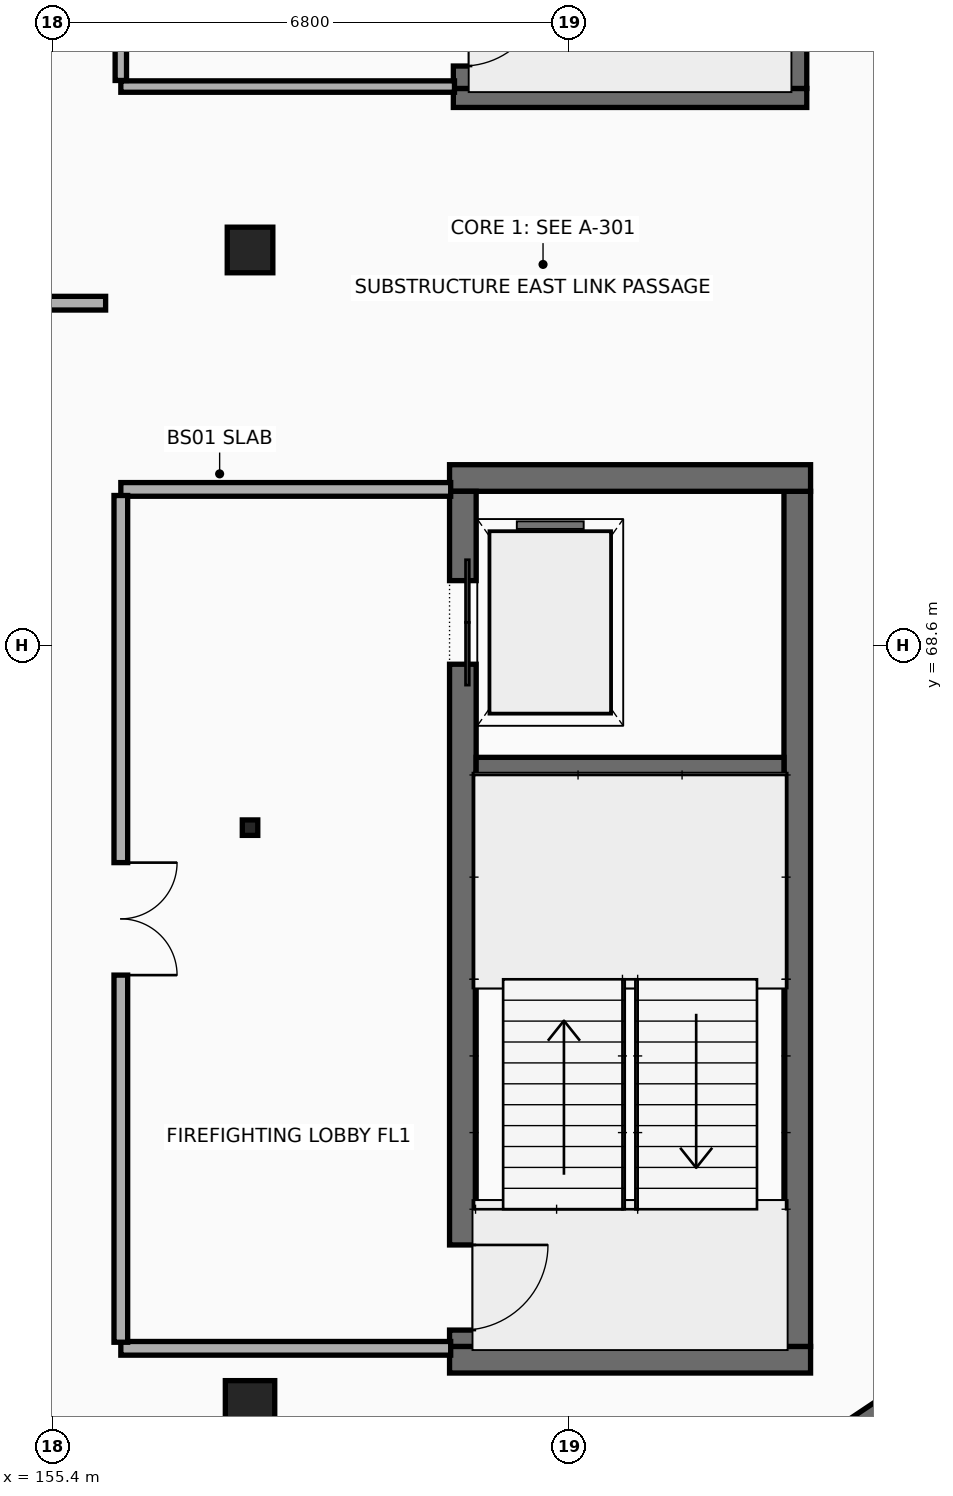
"""IFC4 building model, lengths in metres.
Left out: names, types, materials, properties, quantities, classifications, styles, units other than length and angle.
Written with IfcOpenShell. Run it as: python <this file> out.ifc"""

import sys

from ifc_helpers import new_model, si_unit, direction, frame, frame_2d, origin, origin_2d, place, context, subcontext, project, spatial, rectangle, i_section, extrude, element, fill, save


model = new_model("IFC4")
c1 = context("Model", 3, precision=1e-05, world=origin(), true_north=direction((0.0, 1.0)))
c2 = subcontext(c1, "Body", "Model", "MODEL_VIEW")
j1 = project(units=[si_unit("LENGTHUNIT", "METRE"), si_unit("PLANEANGLEUNIT", "RADIAN")], contexts=[c1])
p1 = place(None, origin())
s1 = spatial("IfcSite", under=j1, at=p1, CompositionType="ELEMENT")
p2 = place(p1, origin())
s2 = spatial("IfcBuilding", under=s1, at=p2, CompositionType="ELEMENT")
p3 = place(p2, frame((0.0, 0.0, -4.2)))
s3 = spatial("IfcBuildingStorey", under=s2, at=p3, CompositionType="ELEMENT", Elevation=-4.2)
p4 = place(p3, frame((160.625, 59.2, -0.415), z_axis=(0.0, 0.0, 1.0), x_axis=(1.0, 0.0, 0.0)))
e1 = element("IfcWall", 1, at=p4, inside=s3, PredefinedType="SHEAR", context=c2, shape_type="SweptSolid", body=[
    extrude(rectangle(XDim=4.75, YDim=0.35, at=frame_2d((2.375, 0.0))), origin(), (0.0, 0.0, 1.0), 4.615),
])
p5 = place(p3, frame((165.2, 59.375, -0.415), z_axis=(0.0, 0.0, 1.0), x_axis=(0.0, 1.0, 0.0)))
e2 = element("IfcWall", 2, at=p5, inside=s3, PredefinedType="SHEAR", context=c2, shape_type="SweptSolid", body=[
    extrude(rectangle(XDim=11.25, YDim=0.35, at=frame_2d((5.625, 0.0))), origin(), (0.0, 0.0, 1.0), 4.615),
])
p6 = place(p3, frame((165.375, 70.8, -0.415), z_axis=(0.0, 0.0, 1.0), x_axis=(-1.0, 0.0, 0.0)))
e3 = element("IfcWall", 3, at=p6, inside=s3, PredefinedType="SHEAR", context=c2, shape_type="SweptSolid", body=[
    extrude(rectangle(XDim=4.75, YDim=0.35, at=frame_2d((2.375, 0.0))), origin(), (0.0, 0.0, 1.0), 4.615),
])
p7 = place(p3, frame((160.8, 70.625, -0.415), z_axis=(0.0, 0.0, 1.0), x_axis=(0.0, -1.0, 0.0)))
e4 = element("IfcWall", 4, at=p7, inside=s3, PredefinedType="SHEAR", context=c2, shape_type="SweptSolid", body=[
    extrude(rectangle(XDim=11.25, YDim=0.35, at=frame_2d((5.625, 0.0))), origin(), (0.0, 0.0, 1.0), 4.615),
])
p8 = place(p7, frame((1.175, 0.0, 0.415)))
e5 = element("IfcOpeningElement", 5, at=p8, cuts=e4, PredefinedType="OPENING", context=c2, shape_type="SweptSolid", body=[
    extrude(rectangle(XDim=1.1, YDim=2.2, at=frame_2d((0.55, 1.1))), frame((0.0, 0.185, 0.0), z_axis=(0.0, -1.0, 0.0), x_axis=(1.0, 0.0, 0.0)), (0.0, 0.0, 1.0), 0.37),
])
p9 = place(p7, frame((9.915, 0.0, 0.415)))
e6 = element("IfcOpeningElement", 6, at=p9, cuts=e4, PredefinedType="OPENING", context=c2, shape_type="SweptSolid", body=[
    extrude(rectangle(XDim=1.12, YDim=2.16, at=frame_2d((0.56, 1.08))), frame((0.0, 0.185, 0.0), z_axis=(0.0, -1.0, 0.0), x_axis=(1.0, 0.0, 0.0)), (0.0, 0.0, 1.0), 0.37),
])
p10 = place(p3, frame((160.975, 67.0, -0.415), z_axis=(0.0, 0.0, 1.0), x_axis=(1.0, 0.0, 0.0)))
e7 = element("IfcWall", 7, at=p10, inside=s3, PredefinedType="SHEAR", context=c2, shape_type="SweptSolid", body=[
    extrude(rectangle(XDim=4.05, YDim=0.25, at=frame_2d((2.025, 0.0))), origin(), (0.0, 0.0, 1.0), 4.615),
])
p11 = place(p3, frame((160.675, 75.8, -0.415), z_axis=(0.0, 0.0, 1.0), x_axis=(1.0, 0.0, 0.0)))
e8 = element("IfcWall", 8, at=p11, inside=s3, PredefinedType="SHEAR", context=c2, shape_type="SweptSolid", body=[
    extrude(rectangle(XDim=4.65, YDim=0.25, at=frame_2d((2.325, 0.0))), origin(), (0.0, 0.0, 1.0), 4.615),
])
p12 = place(p3, frame((165.2, 75.925, -0.415), z_axis=(0.0, 0.0, 1.0), x_axis=(0.0, 1.0, 0.0)))
e9 = element("IfcWall", 9, at=p12, inside=s3, PredefinedType="SHEAR", context=c2, shape_type="SweptSolid", body=[
    extrude(rectangle(XDim=11.35, YDim=0.25, at=frame_2d((5.675, 0.0))), origin(), (0.0, 0.0, 1.0), 4.615),
])
p13 = place(p3, frame((160.8, 87.275, -0.415), z_axis=(0.0, 0.0, 1.0), x_axis=(0.0, -1.0, 0.0)))
e10 = element("IfcWall", 10, at=p13, inside=s3, PredefinedType="SHEAR", context=c2, shape_type="SweptSolid", body=[
    extrude(rectangle(XDim=11.35, YDim=0.25, at=frame_2d((5.675, 0.0))), origin(), (0.0, 0.0, 1.0), 4.615),
])
p14 = place(p13, frame((1.275, 0.0, 0.415)))
e11 = element("IfcOpeningElement", 11, at=p14, cuts=e10, PredefinedType="OPENING", context=c2, shape_type="SweptSolid", body=[
    extrude(rectangle(XDim=1.0, YDim=2.15, at=frame_2d((0.5, 1.075))), frame((0.0, 0.135, 0.0), z_axis=(0.0, -1.0, 0.0), x_axis=(1.0, 0.0, 0.0)), (0.0, 0.0, 1.0), 0.27),
])
p15 = place(p13, frame((9.995, 0.0, 0.415)))
e12 = element("IfcOpeningElement", 12, at=p15, cuts=e10, PredefinedType="OPENING", context=c2, shape_type="SweptSolid", body=[
    extrude(rectangle(XDim=1.06, YDim=2.15, at=frame_2d((0.53, 1.075))), frame((0.0, 0.135, 0.0), z_axis=(0.0, -1.0, 0.0), x_axis=(1.0, 0.0, 0.0)), (0.0, 0.0, 1.0), 0.27),
])
p16 = place(p3, frame((158.0, 58.6, -0.415), z_axis=(0.0, 0.0, 1.0), x_axis=(1.0, 0.0, 0.0)))
e13 = element("IfcColumn", 13, at=p16, inside=s3, PredefinedType="COLUMN", context=c2, shape_type="SweptSolid", body=[
    extrude(rectangle(XDim=0.65, YDim=0.65, at=origin_2d()), origin(), (0.0, 0.0, 1.0), 4.615),
])
p17 = place(p3, frame((158.0, 66.2, -0.415), z_axis=(0.0, 0.0, 1.0), x_axis=(1.0, 0.0, 0.0)))
e14 = element("IfcColumn", 14, at=p17, inside=s3, PredefinedType="COLUMN", context=c2, shape_type="SweptSolid", body=[
    extrude(i_section(OverallWidth=0.204, OverallDepth=0.203, WebThickness=0.007, FlangeThickness=0.011, at=origin_2d()), origin(), (0.0, 0.0, 1.0), 4.615),
])
p18 = place(p3, frame((158.0, 73.8, -0.415), z_axis=(0.0, 0.0, 1.0), x_axis=(1.0, 0.0, 0.0)))
e15 = element("IfcColumn", 15, at=p18, inside=s3, PredefinedType="COLUMN", context=c2, shape_type="SweptSolid", body=[
    extrude(rectangle(XDim=0.6, YDim=0.6, at=origin_2d()), origin(), (0.0, 0.0, 1.0), 4.615),
])
p19 = place(p3, frame((167.739, 59.386, 0.0), z_axis=(0.0, 0.0, 1.0), x_axis=(-0.831383182597, -0.55569956244, 0.0)))
e16 = element("IfcWall", 16, at=p19, inside=s3, PredefinedType="STANDARD", context=c2, shape_type="SweptSolid", body=[
    extrude(rectangle(XDim=2.311, YDim=0.45, at=frame_2d((1.155, 0.0))), origin(), (0.0, 0.0, 1.0), 3.882),
])
p20 = place(p3, frame((156.3, 59.35, 0.0), z_axis=(0.0, 0.0, 1.0), x_axis=(1.0, 0.0, 0.0)))
e17 = element("IfcWall", 17, at=p20, inside=s3, PredefinedType="PARTITIONING", context=c2, shape_type="SweptSolid", body=[
    extrude(rectangle(XDim=4.34, YDim=0.18, at=frame_2d((2.17, 0.0))), origin(), (0.0, 0.0, 1.0), 3.445),
])
p21 = place(p3, frame((160.64, 70.65, 0.0), z_axis=(0.0, 0.0, 1.0), x_axis=(-1.0, 0.0, 0.0)))
e18 = element("IfcWall", 18, at=p21, inside=s3, PredefinedType="PARTITIONING", context=c2, shape_type="SweptSolid", body=[
    extrude(rectangle(XDim=4.34, YDim=0.18, at=frame_2d((2.17, 0.0))), origin(), (0.0, 0.0, 1.0), 3.42),
])
p22 = place(p3, frame((156.3, 70.57, 0.0), z_axis=(0.0, 0.0, 1.0), x_axis=(0.0, -1.0, 0.0)))
e19 = element("IfcWall", 19, at=p22, inside=s3, PredefinedType="PARTITIONING", context=c2, shape_type="SweptSolid", body=[
    extrude(rectangle(XDim=11.14, YDim=0.18, at=frame_2d((5.57, 0.0))), origin(), (0.0, 0.0, 1.0), 3.262),
])
p23 = place(p22, frame((4.83, 0.0, 0.0)))
e20 = element("IfcOpeningElement", 20, at=p23, cuts=e19, PredefinedType="OPENING", context=c2, shape_type="SweptSolid", body=[
    extrude(rectangle(XDim=1.48, YDim=2.22, at=frame_2d((0.74, 1.11))), frame((0.0, 0.1, 0.0), z_axis=(0.0, -1.0, 0.0), x_axis=(1.0, 0.0, 0.0)), (0.0, 0.0, 1.0), 0.2),
])
p24 = place(p3, frame((156.3, 75.95, 0.0), z_axis=(0.0, 0.0, 1.0), x_axis=(1.0, 0.0, 0.0)))
e21 = element("IfcWall", 21, at=p24, inside=s3, PredefinedType="PARTITIONING", context=c2, shape_type="SweptSolid", body=[
    extrude(rectangle(XDim=4.39, YDim=0.15, at=frame_2d((2.195, 0.0))), origin(), (0.0, 0.0, 1.0), 3.395),
])
p25 = place(p3, frame((156.3, 87.17, 0.0), z_axis=(0.0, 0.0, 1.0), x_axis=(0.0, -1.0, 0.0)))
e22 = element("IfcWall", 22, at=p25, inside=s3, PredefinedType="PARTITIONING", context=c2, shape_type="SweptSolid", body=[
    extrude(rectangle(XDim=11.14, YDim=0.15, at=frame_2d((5.57, 0.0))), origin(), (0.0, 0.0, 1.0), 3.337),
])
p26 = place(p25, frame((4.88, 0.0, 0.0)))
e23 = element("IfcOpeningElement", 23, at=p26, cuts=e22, PredefinedType="OPENING", context=c2, shape_type="SweptSolid", body=[
    extrude(rectangle(XDim=1.38, YDim=2.2, at=frame_2d((0.69, 1.1))), frame((0.0, 0.085, 0.0), z_axis=(0.0, -1.0, 0.0), x_axis=(1.0, 0.0, 0.0)), (0.0, 0.0, 1.0), 0.17),
])
p27 = place(p3, frame((144.553, 73.1, 0.0), z_axis=(0.0, 0.0, 1.0), x_axis=(1.0, 0.0, 0.0)))
e24 = element("IfcWall", 24, at=p27, inside=s3, PredefinedType="PARTITIONING", context=c2, shape_type="SweptSolid", body=[
    extrude(rectangle(XDim=11.547, YDim=0.18, at=frame_2d((5.773, 0.0))), origin(), (0.0, 0.0, 1.0), 3.262),
])
p28 = place(p8, origin())
e25 = element("IfcDoor", 25, at=p28, inside=s3, OperationType="DOUBLE_DOOR_SLIDING", PredefinedType="DOOR", context=c2, shape_type="SweptSolid", body=[
    extrude(rectangle(XDim=1.1, YDim=2.2, at=frame_2d((0.55, 1.1))), frame((0.0, 0.025, 0.0), z_axis=(0.0, -1.0, 0.0), x_axis=(1.0, 0.0, 0.0)), (0.0, 0.0, 1.0), 0.05),
])
fill(e5, e25)
p29 = place(p9, origin())
e26 = element("IfcDoor", 26, at=p29, inside=s3, OperationType="SINGLE_SWING_LEFT", PredefinedType="DOOR", context=c2, shape_type="SweptSolid", body=[
    extrude(rectangle(XDim=1.12, YDim=2.16, at=frame_2d((0.56, 1.08))), frame((0.0, 0.025, 0.0), z_axis=(0.0, -1.0, 0.0), x_axis=(1.0, 0.0, 0.0)), (0.0, 0.0, 1.0), 0.05),
])
fill(e6, e26)
p30 = place(p15, origin())
e27 = element("IfcDoor", 27, at=p30, inside=s3, OperationType="SINGLE_SWING_LEFT", PredefinedType="DOOR", context=c2, shape_type="SweptSolid", body=[
    extrude(rectangle(XDim=1.06, YDim=2.15, at=frame_2d((0.53, 1.075))), frame((0.0, 0.025, 0.0), z_axis=(0.0, -1.0, 0.0), x_axis=(1.0, 0.0, 0.0)), (0.0, 0.0, 1.0), 0.05),
])
fill(e12, e27)
p31 = place(p23, origin())
e28 = element("IfcDoor", 28, at=p31, inside=s3, OperationType="DOUBLE_DOOR_SINGLE_SWING", PredefinedType="DOOR", context=c2, shape_type="SweptSolid", body=[
    extrude(rectangle(XDim=1.48, YDim=2.22, at=frame_2d((0.74, 1.11))), frame((0.0, 0.025, 0.0), z_axis=(0.0, -1.0, 0.0), x_axis=(1.0, 0.0, 0.0)), (0.0, 0.0, 1.0), 0.05),
])
fill(e20, e28)
save(model, sys.argv[1])
